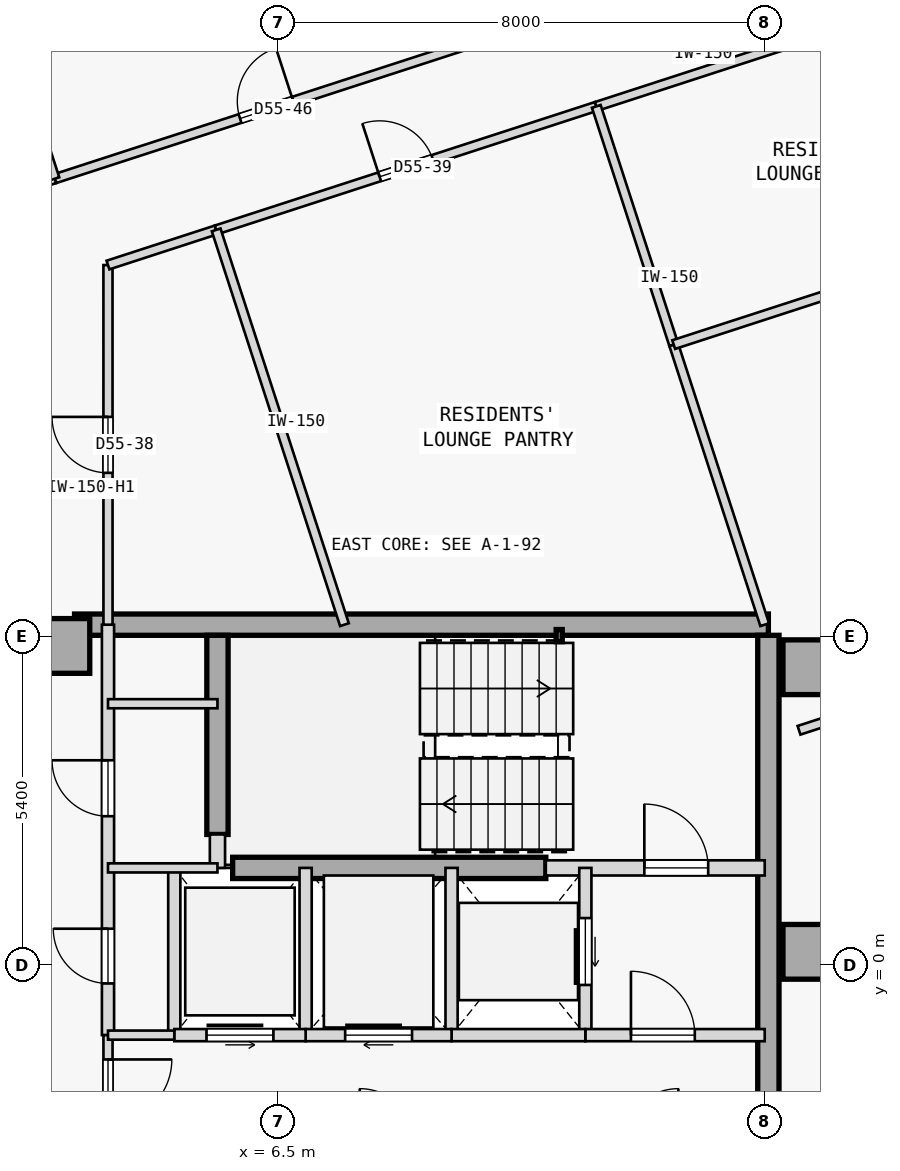
"""IFC4 building model, lengths in metres.
Left out: names, types, materials, properties, quantities, classifications, styles, units other than length and angle.
Written with IfcOpenShell. Run it as: python <this file> out.ifc"""

import sys

from ifc_helpers import new_model, si_unit, direction, frame, frame_2d, origin, origin_2d, place, context, subcontext, project, spatial, rectangle, hollow_rectangle, extrude, element, fill, save


model = new_model("IFC4")
c1 = context("Model", 3, precision=1e-05, world=origin(), true_north=direction((0.0, 1.0)))
c2 = subcontext(c1, "Body", "Model", "MODEL_VIEW")
j1 = project(units=[si_unit("LENGTHUNIT", "METRE"), si_unit("PLANEANGLEUNIT", "RADIAN")], contexts=[c1])
p1 = place(None, origin())
s1 = spatial("IfcSite", under=j1, at=p1, CompositionType="ELEMENT")
p2 = place(p1, origin())
s2 = spatial("IfcBuilding", under=s1, at=p2, CompositionType="ELEMENT")
p3 = place(p2, frame((0.0, 0.0, 210.9)))
s3 = spatial("IfcBuildingStorey", under=s2, at=p3, CompositionType="ELEMENT", Elevation=210.9)
for number, where, z_axis, x_axis in (
    (1, (15.25, 4.9, 0.0), (0.0, 0.0, 1.0), (1.0, 0.0, 0.0)),
    (2, (15.25, 0.22, 0.0), (0.0, 0.0, 1.0), (1.0, 0.0, 0.0)),
    (3, (2.95, 5.25, 0.0), (0.0, 0.0, 1.0), (1.0, 0.0, 0.0)),
):
    element("IfcColumn", number, at=place(p3, frame(where, z_axis=z_axis, x_axis=x_axis)), inside=s3, PredefinedType="COLUMN", context=c2, shape_type="SweptSolid", body=[
        extrude(rectangle(XDim=0.9, YDim=0.9, at=origin_2d()), origin(), (0.0, 0.0, 1.0), 3.35),
    ])
p4 = place(p3, frame((3.15, 5.6, 0.0), z_axis=(0.0, 0.0, 1.0), x_axis=(1.0, 0.0, 0.0)))
e4 = element("IfcWall", 4, at=p4, inside=s3, PredefinedType="SHEAR", context=c2, shape_type="SweptSolid", body=[
    extrude(rectangle(XDim=11.41, YDim=0.35, at=frame_2d((5.705, 0.0))), origin(), (0.0, 0.0, 1.0), 3.125),
])
p5 = place(p3, frame((14.56, -5.425, 0.0), z_axis=(0.0, 0.0, 1.0), x_axis=(0.0, 1.0, 0.0)))
e5 = element("IfcWall", 5, at=p5, inside=s3, PredefinedType="SHEAR", context=c2, shape_type="SweptSolid", body=[
    extrude(rectangle(XDim=10.85, YDim=0.35, at=frame_2d((5.425, 0.0))), origin(), (0.0, 0.0, 1.0), 3.125),
])
p6 = place(p3, frame((5.5, 2.15, 0.0), z_axis=(0.0, 0.0, 1.0), x_axis=(0.0, 1.0, 0.0)))
e6 = element("IfcWall", 6, at=p6, inside=s3, PredefinedType="SHEAR", context=c2, shape_type="SweptSolid", body=[
    extrude(rectangle(XDim=3.275, YDim=0.35, at=frame_2d((1.638, 0.0))), origin(), (0.0, 0.0, 1.0), 3.125),
])
p7 = place(p3, frame((5.75, 1.6, 0.0), z_axis=(0.0, 0.0, 1.0), x_axis=(1.0, 0.0, 0.0)))
e7 = element("IfcWall", 7, at=p7, inside=s3, PredefinedType="SHEAR", context=c2, shape_type="SweptSolid", body=[
    extrude(rectangle(XDim=5.15, YDim=0.35, at=frame_2d((2.575, 0.0))), origin(), (0.0, 0.0, 1.0), 3.125),
])
p8 = place(p3, frame((11.12, 5.42, 0.0), z_axis=(0.0, 0.0, 1.0), x_axis=(1.0, 0.0, 0.0)))
e8 = element("IfcColumn", 8, at=p8, inside=s3, PredefinedType="COLUMN", context=c2, shape_type="SweptSolid", body=[
    extrude(hollow_rectangle(XDim=0.1, YDim=0.2, WallThickness=0.008, at=origin_2d()), origin(), (0.0, 0.0, 1.0), 3.35),
])
p9 = place(p3, frame((10.9, 1.6, 0.0), z_axis=(0.0, 0.0, 1.0), x_axis=(1.0, 0.0, 0.0)))
e9 = element("IfcWall", 9, at=p9, inside=s3, PredefinedType="STANDARD", context=c2, shape_type="SweptSolid", body=[
    extrude(rectangle(XDim=3.6, YDim=0.25, at=frame_2d((1.8, 0.0))), origin(), (0.0, 0.0, 1.0), 3.125),
])
p10 = place(p9, frame((1.62, 0.0, 0.0)))
e10 = element("IfcOpeningElement", 10, at=p10, cuts=e9, PredefinedType="OPENING", context=c2, shape_type="SweptSolid", body=[
    extrude(rectangle(XDim=1.05, YDim=2.15, at=frame_2d((0.525, 1.075))), frame((0.0, 0.135, 0.0), z_axis=(0.0, -1.0, 0.0), x_axis=(1.0, 0.0, 0.0)), (0.0, 0.0, 1.0), 0.27),
])
p11 = place(p3, frame((5.5, 1.6, 0.0), z_axis=(0.0, 0.0, 1.0), x_axis=(0.0, 1.0, 0.0)))
e11 = element("IfcWall", 11, at=p11, inside=s3, PredefinedType="STANDARD", context=c2, shape_type="SweptSolid", body=[
    extrude(rectangle(XDim=0.55, YDim=0.25, at=frame_2d((0.275, 0.0))), origin(), (0.0, 0.0, 1.0), 3.125),
])
p12 = place(p3, frame((3.7, -1.15, 0.0), z_axis=(0.0, 0.0, 1.0), x_axis=(0.0, 1.0, 0.0)))
e12 = element("IfcWall", 12, at=p12, inside=s3, PredefinedType="STANDARD", context=c2, shape_type="SweptSolid", body=[
    extrude(rectangle(XDim=6.75, YDim=0.2, at=frame_2d((3.375, 0.0))), origin(), (0.0, 0.0, 1.0), 3.125),
])
p13 = place(p12, frame((3.6, 0.0, 0.0)))
e13 = element("IfcOpeningElement", 13, at=p13, cuts=e12, PredefinedType="OPENING", context=c2, shape_type="SweptSolid", body=[
    extrude(rectangle(XDim=0.92, YDim=2.15, at=frame_2d((0.46, 1.075))), frame((0.0, 0.11, 0.0), z_axis=(0.0, -1.0, 0.0), x_axis=(1.0, 0.0, 0.0)), (0.0, 0.0, 1.0), 0.22),
])
p14 = place(p12, frame((0.85, 0.0, 0.0)))
e14 = element("IfcOpeningElement", 14, at=p14, cuts=e12, PredefinedType="OPENING", context=c2, shape_type="SweptSolid", body=[
    extrude(rectangle(XDim=0.9, YDim=2.15, at=frame_2d((0.45, 1.075))), frame((0.0, 0.11, 0.0), z_axis=(0.0, -1.0, 0.0), x_axis=(1.0, 0.0, 0.0)), (0.0, 0.0, 1.0), 0.22),
])
p15 = place(p3, frame((3.7, -2.95, 0.0), z_axis=(0.0, 0.0, 1.0), x_axis=(0.0, 1.0, 0.0)))
e15 = element("IfcWall", 15, at=p15, inside=s3, PredefinedType="PARTITIONING", context=c2, shape_type="SweptSolid", body=[
    extrude(rectangle(XDim=1.8, YDim=0.15, at=frame_2d((0.9, 0.0))), origin(), (0.0, 0.0, 1.0), 3.125),
])
p16 = place(p15, frame((0.35, 0.0, 0.0)))
e16 = element("IfcOpeningElement", 16, at=p16, cuts=e15, PredefinedType="OPENING", context=c2, shape_type="SweptSolid", body=[
    extrude(rectangle(XDim=1.05, YDim=2.18, at=frame_2d((0.525, 1.09))), frame((0.0, 0.085, 0.0), z_axis=(0.0, -1.0, 0.0), x_axis=(1.0, 0.0, 0.0)), (0.0, 0.0, 1.0), 0.17),
])
p17 = place(p3, frame((11.55, -1.15, 0.0), z_axis=(0.0, 0.0, 1.0), x_axis=(0.0, 1.0, 0.0)))
e17 = element("IfcWall", 17, at=p17, inside=s3, PredefinedType="STANDARD", context=c2, shape_type="SweptSolid", body=[
    extrude(rectangle(XDim=2.75, YDim=0.2, at=frame_2d((1.375, 0.0))), origin(), (0.0, 0.0, 1.0), 3.125),
])
p18 = place(p17, frame((0.825, 0.0, 0.0)))
e18 = element("IfcOpeningElement", 18, at=p18, cuts=e17, PredefinedType="OPENING", context=c2, shape_type="SweptSolid", body=[
    extrude(rectangle(XDim=1.1, YDim=2.15, at=frame_2d((0.55, 1.075))), frame((0.0, 0.11, 0.0), z_axis=(0.0, -1.0, 0.0), x_axis=(1.0, 0.0, 0.0)), (0.0, 0.0, 1.0), 0.22),
])
p19 = place(p3, frame((9.35, -1.15, 0.0), z_axis=(0.0, 0.0, 1.0), x_axis=(0.0, 1.0, 0.0)))
e19 = element("IfcWall", 19, at=p19, inside=s3, PredefinedType="STANDARD", context=c2, shape_type="SweptSolid", body=[
    extrude(rectangle(XDim=2.75, YDim=0.2, at=frame_2d((1.375, 0.0))), origin(), (0.0, 0.0, 1.0), 3.125),
])
p20 = place(p3, frame((11.55, -1.15, 0.0), z_axis=(0.0, 0.0, 1.0), x_axis=(1.0, 0.0, 0.0)))
e20 = element("IfcWall", 20, at=p20, inside=s3, PredefinedType="STANDARD", context=c2, shape_type="SweptSolid", body=[
    extrude(rectangle(XDim=2.95, YDim=0.2, at=frame_2d((1.475, 0.0))), origin(), (0.0, 0.0, 1.0), 3.125),
])
p21 = place(p20, frame((0.75, 0.0, 0.0)))
e21 = element("IfcOpeningElement", 21, at=p21, cuts=e20, PredefinedType="OPENING", context=c2, shape_type="SweptSolid", body=[
    extrude(rectangle(XDim=1.05, YDim=2.18, at=frame_2d((0.525, 1.09))), frame((0.0, 0.11, 0.0), z_axis=(0.0, -1.0, 0.0), x_axis=(1.0, 0.0, 0.0)), (0.0, 0.0, 1.0), 0.22),
])
p22 = place(p3, frame((9.35, -1.15, 0.0), z_axis=(0.0, 0.0, 1.0), x_axis=(1.0, 0.0, 0.0)))
e22 = element("IfcWall", 22, at=p22, inside=s3, PredefinedType="STANDARD", context=c2, shape_type="SweptSolid", body=[
    extrude(rectangle(XDim=2.2, YDim=0.2, at=frame_2d((1.1, 0.0))), origin(), (0.0, 0.0, 1.0), 3.125),
])
p23 = place(p3, frame((6.95, -1.15, 0.0), z_axis=(0.0, 0.0, 1.0), x_axis=(0.0, 1.0, 0.0)))
e23 = element("IfcWall", 23, at=p23, inside=s3, PredefinedType="STANDARD", context=c2, shape_type="SweptSolid", body=[
    extrude(rectangle(XDim=2.75, YDim=0.2, at=frame_2d((1.375, 0.0))), origin(), (0.0, 0.0, 1.0), 3.125),
])
p24 = place(p3, frame((6.95, -1.15, 0.0), z_axis=(0.0, 0.0, 1.0), x_axis=(1.0, 0.0, 0.0)))
e24 = element("IfcWall", 24, at=p24, inside=s3, PredefinedType="STANDARD", context=c2, shape_type="SweptSolid", body=[
    extrude(rectangle(XDim=2.4, YDim=0.2, at=frame_2d((1.2, 0.0))), origin(), (0.0, 0.0, 1.0), 3.125),
])
p25 = place(p24, frame((0.65, 0.0, 0.0)))
e25 = element("IfcOpeningElement", 25, at=p25, cuts=e24, PredefinedType="OPENING", context=c2, shape_type="SweptSolid", body=[
    extrude(rectangle(XDim=1.1, YDim=2.15, at=frame_2d((0.55, 1.075))), frame((0.0, 0.11, 0.0), z_axis=(0.0, -1.0, 0.0), x_axis=(1.0, 0.0, 0.0)), (0.0, 0.0, 1.0), 0.22),
])
p26 = place(p3, frame((4.79, -1.15, 0.0), z_axis=(0.0, 0.0, 1.0), x_axis=(0.0, 1.0, 0.0)))
e26 = element("IfcWall", 26, at=p26, inside=s3, PredefinedType="STANDARD", context=c2, shape_type="SweptSolid", body=[
    extrude(rectangle(XDim=2.75, YDim=0.2, at=frame_2d((1.375, 0.0))), origin(), (0.0, 0.0, 1.0), 3.125),
])
p27 = place(p3, frame((4.79, -1.15, 0.0), z_axis=(0.0, 0.0, 1.0), x_axis=(1.0, 0.0, 0.0)))
e27 = element("IfcWall", 27, at=p27, inside=s3, PredefinedType="STANDARD", context=c2, shape_type="SweptSolid", body=[
    extrude(rectangle(XDim=2.16, YDim=0.2, at=frame_2d((1.08, 0.0))), origin(), (0.0, 0.0, 1.0), 3.125),
])
p28 = place(p27, frame((0.53, 0.0, 0.0)))
e28 = element("IfcOpeningElement", 28, at=p28, cuts=e27, PredefinedType="OPENING", context=c2, shape_type="SweptSolid", body=[
    extrude(rectangle(XDim=1.1, YDim=2.15, at=frame_2d((0.55, 1.075))), frame((0.0, 0.11, 0.0), z_axis=(0.0, -1.0, 0.0), x_axis=(1.0, 0.0, 0.0)), (0.0, 0.0, 1.0), 0.22),
])
p29 = place(p3, frame((3.7, -1.15, 0.0), z_axis=(0.0, 0.0, 1.0), x_axis=(1.0, 0.0, 0.0)))
e29 = element("IfcWall", 29, at=p29, inside=s3, PredefinedType="PARTITIONING", context=c2, shape_type="SweptSolid", body=[
    extrude(rectangle(XDim=1.09, YDim=0.15, at=frame_2d((0.545, 0.0))), origin(), (0.0, 0.0, 1.0), 3.125),
])
for number, where, z_axis, x_axis in (
    (30, (3.7, 4.3, 0.0), (0.0, 0.0, 1.0), (1.0, 0.0, 0.0)),
    (31, (3.7, 1.6, 0.0), (0.0, 0.0, 1.0), (1.0, 0.0, 0.0)),
):
    element("IfcWall", number, at=place(p3, frame(where, z_axis=z_axis, x_axis=x_axis)), inside=s3, PredefinedType="PARTITIONING", context=c2, shape_type="SweptSolid", body=[
        extrude(rectangle(XDim=1.8, YDim=0.15, at=frame_2d((0.9, 0.0))), origin(), (0.0, 0.0, 1.0), 3.125),
    ])
p30 = place(p3, frame((3.7, 5.6, 0.0), z_axis=(0.0, 0.0, 1.0), x_axis=(-0.000123839008, 0.999999992332, 0.0)))
e32 = element("IfcWall", 32, at=p30, inside=s3, PredefinedType="PARTITIONING", context=c2, shape_type="SweptSolid", body=[
    extrude(rectangle(XDim=5.914, YDim=0.15, at=frame_2d((2.957, 0.0))), origin(), (0.0, 0.0, 1.0), 2.675),
])
p31 = place(p30, frame((2.497, 0.0, 0.0)))
e33 = element("IfcOpeningElement", 33, at=p31, cuts=e32, PredefinedType="OPENING", context=c2, shape_type="SweptSolid", body=[
    extrude(rectangle(XDim=0.92, YDim=2.15, at=frame_2d((0.46, 1.075))), frame((0.0, 0.085, 0.0), z_axis=(0.0, -1.0, 0.0), x_axis=(1.0, 0.0, 0.0)), (0.0, 0.0, 1.0), 0.17),
])
p32 = place(p3, frame((3.699, 11.514, 0.0), z_axis=(0.0, 0.0, 1.0), x_axis=(0.951069540665, 0.308976906612, 0.0)))
e34 = element("IfcWall", 34, at=p32, inside=s3, PredefinedType="PARTITIONING", context=c2, shape_type="SweptSolid", body=[
    extrude(rectangle(XDim=1.871, YDim=0.15, at=frame_2d((0.936, 0.0))), origin(), (0.0, 0.0, 1.0), 3.125),
])
p33 = place(p3, frame((5.479, 12.092, 0.0), z_axis=(0.0, 0.0, 1.0), x_axis=(0.951051809397, 0.309031480343, 0.0)))
e35 = element("IfcWall", 35, at=p33, inside=s3, PredefinedType="PARTITIONING", context=c2, shape_type="SweptSolid", body=[
    extrude(rectangle(XDim=6.573, YDim=0.15, at=frame_2d((3.287, 0.0))), origin(), (0.0, 0.0, 1.0), 3.125),
])
p34 = place(p33, frame((2.826, 0.0, 0.0)))
e36 = element("IfcOpeningElement", 36, at=p34, cuts=e35, PredefinedType="OPENING", context=c2, shape_type="SweptSolid", body=[
    extrude(rectangle(XDim=0.92, YDim=2.15, at=frame_2d((0.46, 1.075))), frame((0.0, 0.085, 0.0), z_axis=(0.0, -1.0, 0.0), x_axis=(1.0, 0.0, 0.0)), (0.0, 0.0, 1.0), 0.17),
])
p35 = place(p3, frame((-1.089, 11.661, 0.0), z_axis=(0.0, 0.0, 1.0), x_axis=(0.951057158344, 0.309015018346, 0.0)))
e37 = element("IfcWall", 37, at=p35, inside=s3, PredefinedType="PARTITIONING", context=c2, shape_type="SweptSolid", body=[
    extrude(rectangle(XDim=4.118, YDim=0.15, at=frame_2d((2.059, 0.0))), origin(), (0.0, 0.0, 1.0), 3.125),
])
p36 = place(p35, frame((1.599, 0.0, 0.0)))
e38 = element("IfcOpeningElement", 38, at=p36, cuts=e37, PredefinedType="OPENING", context=c2, shape_type="SweptSolid", body=[
    extrude(rectangle(XDim=0.92, YDim=2.15, at=frame_2d((0.46, 1.075))), frame((0.0, 0.085, 0.0), z_axis=(0.0, -1.0, 0.0), x_axis=(1.0, 0.0, 0.0)), (0.0, 0.0, 1.0), 0.17),
])
p37 = place(p3, frame((2.827, 12.934, 0.0), z_axis=(0.0, 0.0, 1.0), x_axis=(0.951056608557, 0.309016710423, 0.0)))
e39 = element("IfcWall", 39, at=p37, inside=s3, PredefinedType="PARTITIONING", context=c2, shape_type="SweptSolid", body=[
    extrude(rectangle(XDim=7.322, YDim=0.15, at=frame_2d((3.661, 0.0))), origin(), (0.0, 0.0, 1.0), 3.125),
])
p38 = place(p37, frame((3.201, 0.0, 0.0)))
e40 = element("IfcOpeningElement", 40, at=p38, cuts=e39, PredefinedType="OPENING", context=c2, shape_type="SweptSolid", body=[
    extrude(rectangle(XDim=0.92, YDim=2.15, at=frame_2d((0.46, 1.075))), frame((0.0, 0.085, 0.0), z_axis=(0.0, -1.0, 0.0), x_axis=(1.0, 0.0, 0.0)), (0.0, 0.0, 1.0), 0.17),
])
p39 = place(p3, frame((11.73, 14.123, 0.0), z_axis=(0.0, 0.0, 1.0), x_axis=(0.951060263663, 0.309005460926, 0.0)))
e41 = element("IfcWall", 41, at=p39, inside=s3, PredefinedType="PARTITIONING", context=c2, shape_type="SweptSolid", body=[
    extrude(rectangle(XDim=12.327, YDim=0.15, at=frame_2d((6.164, 0.0))), origin(), (0.0, 0.0, 1.0), 3.125),
])
p40 = place(p39, frame((5.704, 0.0, 0.0)))
e42 = element("IfcOpeningElement", 42, at=p40, cuts=e41, PredefinedType="OPENING", context=c2, shape_type="SweptSolid", body=[
    extrude(rectangle(XDim=0.92, YDim=2.15, at=frame_2d((0.46, 1.075))), frame((0.0, 0.085, 0.0), z_axis=(0.0, -1.0, 0.0), x_axis=(1.0, 0.0, 0.0)), (0.0, 0.0, 1.0), 0.17),
])
p41 = place(p3, frame((7.588, 5.6, 0.0), z_axis=(0.0, 0.0, 1.0), x_axis=(-0.309018946982, 0.951055881852, 0.0)))
e43 = element("IfcWall", 43, at=p41, inside=s3, PredefinedType="PARTITIONING", context=c2, shape_type="SweptSolid", body=[
    extrude(rectangle(XDim=6.826, YDim=0.15, at=frame_2d((3.413, 0.0))), origin(), (0.0, 0.0, 1.0), 3.125),
])
p42 = place(p3, frame((14.5, 5.6, 0.0), z_axis=(0.0, 0.0, 1.0), x_axis=(-0.308974360462, 0.951070367837, 0.0)))
e44 = element("IfcWall", 44, at=p42, inside=s3, PredefinedType="PARTITIONING", context=c2, shape_type="SweptSolid", body=[
    extrude(rectangle(XDim=4.843, YDim=0.15, at=frame_2d((2.421, 0.0))), origin(), (0.0, 0.0, 1.0), 3.125),
])
p43 = place(p3, frame((13.003, 10.206, 0.0), z_axis=(0.0, 0.0, 1.0), x_axis=(-0.309035144366, 0.951050618814, 0.0)))
e45 = element("IfcWall", 45, at=p43, inside=s3, PredefinedType="PARTITIONING", context=c2, shape_type="SweptSolid", body=[
    extrude(rectangle(XDim=4.119, YDim=0.15, at=frame_2d((2.06, 0.0))), origin(), (0.0, 0.0, 1.0), 3.125),
])
p44 = place(p3, frame((2.827, 12.934, 0.0), z_axis=(0.0, 0.0, 1.0), x_axis=(-0.308998913866, 0.951062390819, 0.0)))
e46 = element("IfcWall", 46, at=p44, inside=s3, PredefinedType="PARTITIONING", context=c2, shape_type="SweptSolid", body=[
    extrude(rectangle(XDim=7.284, YDim=0.15, at=frame_2d((3.642, 0.0))), origin(), (0.0, 0.0, 1.0), 3.125),
])
p45 = place(p3, frame((15.064, 3.863, 0.0), z_axis=(0.0, 0.0, 1.0), x_axis=(0.951061448945, 0.309001812827, 0.0)))
e47 = element("IfcWall", 47, at=p45, inside=s3, PredefinedType="PARTITIONING", context=c2, shape_type="SweptSolid", body=[
    extrude(rectangle(XDim=10.352, YDim=0.15, at=frame_2d((5.176, 0.0))), origin(), (0.0, 0.0, 1.0), 3.125),
])
p46 = place(p45, frame((4.716, 0.0, 0.0)))
e48 = element("IfcOpeningElement", 48, at=p46, cuts=e47, PredefinedType="OPENING", context=c2, shape_type="SweptSolid", body=[
    extrude(rectangle(XDim=0.92, YDim=2.15, at=frame_2d((0.46, 1.075))), frame((0.0, 0.085, 0.0), z_axis=(0.0, -1.0, 0.0), x_axis=(1.0, 0.0, 0.0)), (0.0, 0.0, 1.0), 0.17),
])
p47 = place(p3, frame((13.003, 10.206, 0.0), z_axis=(0.0, 0.0, 1.0), x_axis=(0.951060263663, 0.309005460926, 0.0)))
e49 = element("IfcWall", 49, at=p47, inside=s3, PredefinedType="PARTITIONING", context=c2, shape_type="SweptSolid", body=[
    extrude(rectangle(XDim=12.327, YDim=0.15, at=frame_2d((6.164, 0.0))), origin(), (0.0, 0.0, 1.0), 2.675),
])
p48 = place(p10, origin())
e50 = element("IfcDoor", 50, at=p48, inside=s3, OperationType="SINGLE_SWING_LEFT", PredefinedType="DOOR", context=c2, shape_type="SweptSolid", body=[
    extrude(rectangle(XDim=1.05, YDim=2.15, at=frame_2d((0.525, 1.075))), frame((0.0, 0.025, 0.0), z_axis=(0.0, -1.0, 0.0), x_axis=(1.0, 0.0, 0.0)), (0.0, 0.0, 1.0), 0.05),
])
fill(e10, e50)
p49 = place(p21, origin())
e51 = element("IfcDoor", 51, at=p49, inside=s3, OperationType="SINGLE_SWING_LEFT", PredefinedType="DOOR", context=c2, shape_type="SweptSolid", body=[
    extrude(rectangle(XDim=1.05, YDim=2.18, at=frame_2d((0.525, 1.09))), frame((0.0, 0.025, 0.0), z_axis=(0.0, -1.0, 0.0), x_axis=(1.0, 0.0, 0.0)), (0.0, 0.0, 1.0), 0.05),
])
fill(e21, e51)
p50 = place(p16, frame((1.05, 0.0, 0.0), z_axis=(0.0, 0.0, 1.0), x_axis=(-1.0, 0.0, 0.0)))
e52 = element("IfcDoor", 52, at=p50, inside=s3, OperationType="SINGLE_SWING_RIGHT", PredefinedType="DOOR", context=c2, shape_type="SweptSolid", body=[
    extrude(rectangle(XDim=1.05, YDim=2.18, at=frame_2d((0.525, 1.09))), frame((0.0, 0.025, 0.0), z_axis=(0.0, -1.0, 0.0), x_axis=(1.0, 0.0, 0.0)), (0.0, 0.0, 1.0), 0.05),
])
fill(e16, e52)
p51 = place(p18, origin())
e53 = element("IfcDoor", 53, at=p51, inside=s3, OperationType="SLIDING_TO_RIGHT", PredefinedType="DOOR", context=c2, shape_type="SweptSolid", body=[
    extrude(rectangle(XDim=1.1, YDim=2.15, at=frame_2d((0.55, 1.075))), frame((0.0, 0.025, 0.0), z_axis=(0.0, -1.0, 0.0), x_axis=(1.0, 0.0, 0.0)), (0.0, 0.0, 1.0), 0.05),
])
fill(e18, e53)
p52 = place(p25, origin())
e54 = element("IfcDoor", 54, at=p52, inside=s3, OperationType="SLIDING_TO_RIGHT", PredefinedType="DOOR", context=c2, shape_type="SweptSolid", body=[
    extrude(rectangle(XDim=1.1, YDim=2.15, at=frame_2d((0.55, 1.075))), frame((0.0, 0.025, 0.0), z_axis=(0.0, -1.0, 0.0), x_axis=(1.0, 0.0, 0.0)), (0.0, 0.0, 1.0), 0.05),
])
fill(e25, e54)
p53 = place(p28, origin())
e55 = element("IfcDoor", 55, at=p53, inside=s3, OperationType="SLIDING_TO_LEFT", PredefinedType="DOOR", context=c2, shape_type="SweptSolid", body=[
    extrude(rectangle(XDim=1.1, YDim=2.15, at=frame_2d((0.55, 1.075))), frame((0.0, 0.025, 0.0), z_axis=(0.0, -1.0, 0.0), x_axis=(1.0, 0.0, 0.0)), (0.0, 0.0, 1.0), 0.05),
])
fill(e28, e55)
p54 = place(p13, origin())
e56 = element("IfcDoor", 56, at=p54, inside=s3, OperationType="SINGLE_SWING_RIGHT", PredefinedType="DOOR", context=c2, shape_type="SweptSolid", body=[
    extrude(rectangle(XDim=0.92, YDim=2.15, at=frame_2d((0.46, 1.075))), frame((0.0, 0.025, 0.0), z_axis=(0.0, -1.0, 0.0), x_axis=(1.0, 0.0, 0.0)), (0.0, 0.0, 1.0), 0.05),
])
fill(e13, e56)
p55 = place(p14, origin())
e57 = element("IfcDoor", 57, at=p55, inside=s3, OperationType="SINGLE_SWING_RIGHT", PredefinedType="DOOR", context=c2, shape_type="SweptSolid", body=[
    extrude(rectangle(XDim=0.9, YDim=2.15, at=frame_2d((0.45, 1.075))), frame((0.0, 0.025, 0.0), z_axis=(0.0, -1.0, 0.0), x_axis=(1.0, 0.0, 0.0)), (0.0, 0.0, 1.0), 0.05),
])
fill(e14, e57)
p56 = place(p31, origin())
e58 = element("IfcDoor", 58, at=p56, inside=s3, OperationType="SINGLE_SWING_RIGHT", PredefinedType="DOOR", context=c2, shape_type="SweptSolid", body=[
    extrude(rectangle(XDim=0.92, YDim=2.15, at=frame_2d((0.46, 1.075))), frame((0.0, 0.025, 0.0), z_axis=(0.0, -1.0, 0.0), x_axis=(1.0, 0.0, 0.0)), (0.0, 0.0, 1.0), 0.05),
])
fill(e33, e58)
p57 = place(p34, origin())
e59 = element("IfcDoor", 59, at=p57, inside=s3, OperationType="SINGLE_SWING_LEFT", PredefinedType="DOOR", context=c2, shape_type="SweptSolid", body=[
    extrude(rectangle(XDim=0.92, YDim=2.15, at=frame_2d((0.46, 1.075))), frame((0.0, 0.025, 0.0), z_axis=(0.0, -1.0, 0.0), x_axis=(1.0, 0.0, 0.0)), (0.0, 0.0, 1.0), 0.05),
])
fill(e36, e59)
p58 = place(p38, origin())
e60 = element("IfcDoor", 60, at=p58, inside=s3, OperationType="SINGLE_SWING_RIGHT", PredefinedType="DOOR", context=c2, shape_type="SweptSolid", body=[
    extrude(rectangle(XDim=0.92, YDim=2.15, at=frame_2d((0.46, 1.075))), frame((0.0, 0.025, 0.0), z_axis=(0.0, -1.0, 0.0), x_axis=(1.0, 0.0, 0.0)), (0.0, 0.0, 1.0), 0.05),
])
fill(e40, e60)
save(model, sys.argv[1])
